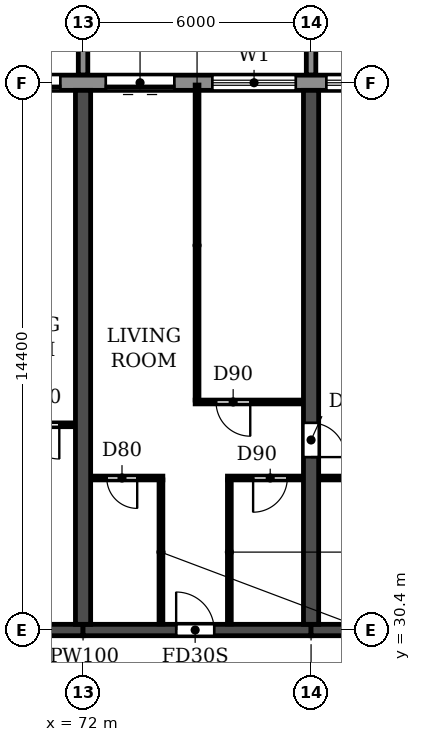
"""IFC4 building model, lengths in metres.
Left out: names, types, materials, properties, quantities, classifications, styles, units other than length and angle.
Written with IfcOpenShell. Run it as: python <this file> out.ifc"""

import sys

from ifc_helpers import new_model, si_unit, direction, frame, frame_2d, origin, place, context, subcontext, project, spatial, polyline, rectangle, outline, extrude, source, transform, mapped, element, fill, save


model = new_model("IFC4")
c1 = context("Model", 3, precision=1e-05, world=origin(), true_north=direction((0.0, 1.0)))
c2 = subcontext(c1, "Body", "Model", "MODEL_VIEW")
j1 = project(units=[si_unit("LENGTHUNIT", "METRE"), si_unit("PLANEANGLEUNIT", "RADIAN")], contexts=[c1])
p1 = place(None, origin())
s1 = spatial("IfcSite", under=j1, at=p1, CompositionType="ELEMENT")
p2 = place(p1, origin())
s2 = spatial("IfcBuilding", under=s1, at=p2, CompositionType="ELEMENT")
p3 = place(p2, frame((0.0, 0.0, 43.2)))
s3 = spatial("IfcBuildingStorey", under=s2, at=p3, CompositionType="ELEMENT", Elevation=43.2)
p4 = place(p3, frame((72.0, 30.55, 0.0), z_axis=(0.0, 0.0, 1.0), x_axis=(0.0, 1.0, 0.0)))
e1 = element("IfcWall", 1, at=p4, inside=s3, PredefinedType="SHEAR", context=c2, shape_type="SweptSolid", body=[
    extrude(rectangle(XDim=14.05, YDim=0.4, at=frame_2d((7.025, 0.0))), origin(), (0.0, 0.0, 1.0), 3.05),
])
p5 = place(p3, frame((78.0, 30.55, 0.0), z_axis=(0.0, 0.0, 1.0), x_axis=(0.0, 1.0, 0.0)))
e2 = element("IfcWall", 2, at=p5, inside=s3, PredefinedType="SHEAR", context=c2, shape_type="SweptSolid", body=[
    extrude(rectangle(XDim=14.05, YDim=0.4, at=frame_2d((7.025, 0.0))), origin(), (0.0, 0.0, 1.0), 3.05),
])
p6 = place(p5, frame((4.4, 0.0, 0.0)))
e3 = element("IfcOpeningElement", 3, at=p6, cuts=e2, PredefinedType="OPENING", context=c2, shape_type="SweptSolid", body=[
    extrude(rectangle(XDim=0.9, YDim=2.1, at=frame_2d((0.45, 1.05))), frame((0.0, 0.21, 0.0), z_axis=(0.0, -1.0, 0.0), x_axis=(1.0, 0.0, 0.0)), (0.0, 0.0, 1.0), 0.42),
])
p7 = place(p3, frame((66.0, 30.4, 0.0), z_axis=(0.0, 0.0, 1.0), x_axis=(1.0, 0.0, 0.0)))
e4 = element("IfcWall", 4, at=p7, inside=s3, PredefinedType="SHEAR", context=c2, shape_type="SweptSolid", body=[
    extrude(rectangle(XDim=6.0, YDim=0.3, at=frame_2d((3.0, 0.0))), origin(), (0.0, 0.0, 1.0), 2.45),
])
p8 = place(p7, frame((2.45, 0.0, 0.0)))
e5 = element("IfcOpeningElement", 5, at=p8, cuts=e4, PredefinedType="OPENING", context=c2, shape_type="SweptSolid", body=[
    extrude(rectangle(XDim=1.0, YDim=2.1, at=frame_2d((0.5, 1.05))), frame((0.0, 0.16, 0.0), z_axis=(0.0, -1.0, 0.0), x_axis=(1.0, 0.0, 0.0)), (0.0, 0.0, 1.0), 0.32),
])
p9 = place(p3, frame((72.0, 30.4, 0.0), z_axis=(0.0, 0.0, 1.0), x_axis=(1.0, 0.0, 0.0)))
e6 = element("IfcWall", 6, at=p9, inside=s3, PredefinedType="SHEAR", context=c2, shape_type="SweptSolid", body=[
    extrude(rectangle(XDim=6.0, YDim=0.3, at=frame_2d((3.0, 0.0))), origin(), (0.0, 0.0, 1.0), 2.45),
])
p10 = place(p9, frame((2.45, 0.0, 0.0)))
e7 = element("IfcOpeningElement", 7, at=p10, cuts=e6, PredefinedType="OPENING", context=c2, shape_type="SweptSolid", body=[
    extrude(rectangle(XDim=1.0, YDim=2.1, at=frame_2d((0.5, 1.05))), frame((0.0, 0.16, 0.0), z_axis=(0.0, -1.0, 0.0), x_axis=(1.0, 0.0, 0.0)), (0.0, 0.0, 1.0), 0.32),
])
p11 = place(p3, frame((78.0, 30.4, 0.0), z_axis=(0.0, 0.0, 1.0), x_axis=(1.0, 0.0, 0.0)))
e8 = element("IfcWall", 8, at=p11, inside=s3, PredefinedType="SHEAR", context=c2, shape_type="SweptSolid", body=[
    extrude(rectangle(XDim=6.0, YDim=0.3, at=frame_2d((3.0, 0.0))), origin(), (0.0, 0.0, 1.0), 2.45),
])
p12 = place(p3, frame((97.317, 44.8, 0.0), z_axis=(0.0, 0.0, 1.0), x_axis=(-1.0, 0.0, 0.0)))
e9 = element("IfcWall", 9, at=p12, inside=s3, PredefinedType="STANDARD", context=c2, shape_type="SweptSolid", body=[
    extrude(rectangle(XDim=92.634, YDim=0.4, at=frame_2d((46.317, 0.0))), origin(), (0.0, 0.0, 1.0), 3.05),
])
p13 = place(p12, frame((88.917, 0.0, 0.0)))
e10 = element("IfcOpeningElement", 10, at=p13, cuts=e9, PredefinedType="OPENING", context=c2, shape_type="SweptSolid", body=[
    extrude(rectangle(XDim=1.8, YDim=2.4, at=frame_2d((0.9, 1.2))), frame((0.0, 0.21, 0.0), z_axis=(0.0, -1.0, 0.0), x_axis=(1.0, 0.0, 0.0)), (0.0, 0.0, 1.0), 0.42),
])
p14 = place(p12, frame((85.717, 0.0, 0.9)))
e11 = element("IfcOpeningElement", 11, at=p14, cuts=e9, PredefinedType="OPENING", context=c2, shape_type="SweptSolid", body=[
    extrude(rectangle(XDim=2.2, YDim=1.5, at=frame_2d((1.1, 0.75))), frame((0.0, 0.21, 0.0), z_axis=(0.0, -1.0, 0.0), x_axis=(1.0, 0.0, 0.0)), (0.0, 0.0, 1.0), 0.42),
])
p15 = place(p12, frame((82.717, 0.0, 0.9)))
e12 = element("IfcOpeningElement", 12, at=p15, cuts=e9, PredefinedType="OPENING", context=c2, shape_type="SweptSolid", body=[
    extrude(rectangle(XDim=2.2, YDim=1.5, at=frame_2d((1.1, 0.75))), frame((0.0, 0.21, 0.0), z_axis=(0.0, -1.0, 0.0), x_axis=(1.0, 0.0, 0.0)), (0.0, 0.0, 1.0), 0.42),
])
p16 = place(p12, frame((79.717, 0.0, 0.9)))
e13 = element("IfcOpeningElement", 13, at=p16, cuts=e9, PredefinedType="OPENING", context=c2, shape_type="SweptSolid", body=[
    extrude(rectangle(XDim=2.2, YDim=1.5, at=frame_2d((1.1, 0.75))), frame((0.0, 0.21, 0.0), z_axis=(0.0, -1.0, 0.0), x_axis=(1.0, 0.0, 0.0)), (0.0, 0.0, 1.0), 0.42),
])
p17 = place(p12, frame((76.717, 0.0, 0.9)))
e14 = element("IfcOpeningElement", 14, at=p17, cuts=e9, PredefinedType="OPENING", context=c2, shape_type="SweptSolid", body=[
    extrude(rectangle(XDim=2.2, YDim=1.5, at=frame_2d((1.1, 0.75))), frame((0.0, 0.21, 0.0), z_axis=(0.0, -1.0, 0.0), x_axis=(1.0, 0.0, 0.0)), (0.0, 0.0, 1.0), 0.42),
])
p18 = place(p12, frame((73.917, 0.0, 0.0)))
e15 = element("IfcOpeningElement", 15, at=p18, cuts=e9, PredefinedType="OPENING", context=c2, shape_type="SweptSolid", body=[
    extrude(rectangle(XDim=1.8, YDim=2.4, at=frame_2d((0.9, 1.2))), frame((0.0, 0.21, 0.0), z_axis=(0.0, -1.0, 0.0), x_axis=(1.0, 0.0, 0.0)), (0.0, 0.0, 1.0), 0.42),
])
p19 = place(p12, frame((70.717, 0.0, 0.9)))
e16 = element("IfcOpeningElement", 16, at=p19, cuts=e9, PredefinedType="OPENING", context=c2, shape_type="SweptSolid", body=[
    extrude(rectangle(XDim=2.2, YDim=1.5, at=frame_2d((1.1, 0.75))), frame((0.0, 0.21, 0.0), z_axis=(0.0, -1.0, 0.0), x_axis=(1.0, 0.0, 0.0)), (0.0, 0.0, 1.0), 0.42),
])
p20 = place(p12, frame((67.717, 0.0, 0.9)))
e17 = element("IfcOpeningElement", 17, at=p20, cuts=e9, PredefinedType="OPENING", context=c2, shape_type="SweptSolid", body=[
    extrude(rectangle(XDim=2.2, YDim=1.5, at=frame_2d((1.1, 0.75))), frame((0.0, 0.21, 0.0), z_axis=(0.0, -1.0, 0.0), x_axis=(1.0, 0.0, 0.0)), (0.0, 0.0, 1.0), 0.42),
])
p21 = place(p12, frame((64.717, 0.0, 0.9)))
e18 = element("IfcOpeningElement", 18, at=p21, cuts=e9, PredefinedType="OPENING", context=c2, shape_type="SweptSolid", body=[
    extrude(rectangle(XDim=2.2, YDim=1.5, at=frame_2d((1.1, 0.75))), frame((0.0, 0.21, 0.0), z_axis=(0.0, -1.0, 0.0), x_axis=(1.0, 0.0, 0.0)), (0.0, 0.0, 1.0), 0.42),
])
p22 = place(p12, frame((61.917, 0.0, 0.0)))
e19 = element("IfcOpeningElement", 19, at=p22, cuts=e9, PredefinedType="OPENING", context=c2, shape_type="SweptSolid", body=[
    extrude(rectangle(XDim=1.8, YDim=2.4, at=frame_2d((0.9, 1.2))), frame((0.0, 0.21, 0.0), z_axis=(0.0, -1.0, 0.0), x_axis=(1.0, 0.0, 0.0)), (0.0, 0.0, 1.0), 0.42),
])
p23 = place(p12, frame((58.717, 0.0, 0.9)))
e20 = element("IfcOpeningElement", 20, at=p23, cuts=e9, PredefinedType="OPENING", context=c2, shape_type="SweptSolid", body=[
    extrude(rectangle(XDim=2.2, YDim=1.5, at=frame_2d((1.1, 0.75))), frame((0.0, 0.21, 0.0), z_axis=(0.0, -1.0, 0.0), x_axis=(1.0, 0.0, 0.0)), (0.0, 0.0, 1.0), 0.42),
])
p24 = place(p12, frame((55.717, 0.0, 0.9)))
e21 = element("IfcOpeningElement", 21, at=p24, cuts=e9, PredefinedType="OPENING", context=c2, shape_type="SweptSolid", body=[
    extrude(rectangle(XDim=2.2, YDim=1.5, at=frame_2d((1.1, 0.75))), frame((0.0, 0.21, 0.0), z_axis=(0.0, -1.0, 0.0), x_axis=(1.0, 0.0, 0.0)), (0.0, 0.0, 1.0), 0.42),
])
p25 = place(p12, frame((52.717, 0.0, 0.9)))
e22 = element("IfcOpeningElement", 22, at=p25, cuts=e9, PredefinedType="OPENING", context=c2, shape_type="SweptSolid", body=[
    extrude(rectangle(XDim=2.2, YDim=1.5, at=frame_2d((1.1, 0.75))), frame((0.0, 0.21, 0.0), z_axis=(0.0, -1.0, 0.0), x_axis=(1.0, 0.0, 0.0)), (0.0, 0.0, 1.0), 0.42),
])
p26 = place(p12, frame((49.917, 0.0, 0.0)))
e23 = element("IfcOpeningElement", 23, at=p26, cuts=e9, PredefinedType="OPENING", context=c2, shape_type="SweptSolid", body=[
    extrude(rectangle(XDim=1.8, YDim=2.4, at=frame_2d((0.9, 1.2))), frame((0.0, 0.21, 0.0), z_axis=(0.0, -1.0, 0.0), x_axis=(1.0, 0.0, 0.0)), (0.0, 0.0, 1.0), 0.42),
])
p27 = place(p12, frame((46.717, 0.0, 0.9)))
e24 = element("IfcOpeningElement", 24, at=p27, cuts=e9, PredefinedType="OPENING", context=c2, shape_type="SweptSolid", body=[
    extrude(rectangle(XDim=2.2, YDim=1.5, at=frame_2d((1.1, 0.75))), frame((0.0, 0.21, 0.0), z_axis=(0.0, -1.0, 0.0), x_axis=(1.0, 0.0, 0.0)), (0.0, 0.0, 1.0), 0.42),
])
p28 = place(p12, frame((43.717, 0.0, 0.9)))
e25 = element("IfcOpeningElement", 25, at=p28, cuts=e9, PredefinedType="OPENING", context=c2, shape_type="SweptSolid", body=[
    extrude(rectangle(XDim=2.2, YDim=1.5, at=frame_2d((1.1, 0.75))), frame((0.0, 0.21, 0.0), z_axis=(0.0, -1.0, 0.0), x_axis=(1.0, 0.0, 0.0)), (0.0, 0.0, 1.0), 0.42),
])
p29 = place(p12, frame((40.717, 0.0, 0.9)))
e26 = element("IfcOpeningElement", 26, at=p29, cuts=e9, PredefinedType="OPENING", context=c2, shape_type="SweptSolid", body=[
    extrude(rectangle(XDim=2.2, YDim=1.5, at=frame_2d((1.1, 0.75))), frame((0.0, 0.21, 0.0), z_axis=(0.0, -1.0, 0.0), x_axis=(1.0, 0.0, 0.0)), (0.0, 0.0, 1.0), 0.42),
])
p30 = place(p12, frame((37.917, 0.0, 0.0)))
e27 = element("IfcOpeningElement", 27, at=p30, cuts=e9, PredefinedType="OPENING", context=c2, shape_type="SweptSolid", body=[
    extrude(rectangle(XDim=1.8, YDim=2.4, at=frame_2d((0.9, 1.2))), frame((0.0, 0.21, 0.0), z_axis=(0.0, -1.0, 0.0), x_axis=(1.0, 0.0, 0.0)), (0.0, 0.0, 1.0), 0.42),
])
p31 = place(p12, frame((34.717, 0.0, 0.9)))
e28 = element("IfcOpeningElement", 28, at=p31, cuts=e9, PredefinedType="OPENING", context=c2, shape_type="SweptSolid", body=[
    extrude(rectangle(XDim=2.2, YDim=1.5, at=frame_2d((1.1, 0.75))), frame((0.0, 0.21, 0.0), z_axis=(0.0, -1.0, 0.0), x_axis=(1.0, 0.0, 0.0)), (0.0, 0.0, 1.0), 0.42),
])
p32 = place(p12, frame((31.717, 0.0, 0.9)))
e29 = element("IfcOpeningElement", 29, at=p32, cuts=e9, PredefinedType="OPENING", context=c2, shape_type="SweptSolid", body=[
    extrude(rectangle(XDim=2.2, YDim=1.5, at=frame_2d((1.1, 0.75))), frame((0.0, 0.21, 0.0), z_axis=(0.0, -1.0, 0.0), x_axis=(1.0, 0.0, 0.0)), (0.0, 0.0, 1.0), 0.42),
])
p33 = place(p12, frame((28.717, 0.0, 0.9)))
e30 = element("IfcOpeningElement", 30, at=p33, cuts=e9, PredefinedType="OPENING", context=c2, shape_type="SweptSolid", body=[
    extrude(rectangle(XDim=2.2, YDim=1.5, at=frame_2d((1.1, 0.75))), frame((0.0, 0.21, 0.0), z_axis=(0.0, -1.0, 0.0), x_axis=(1.0, 0.0, 0.0)), (0.0, 0.0, 1.0), 0.42),
])
p34 = place(p12, frame((25.917, 0.0, 0.0)))
e31 = element("IfcOpeningElement", 31, at=p34, cuts=e9, PredefinedType="OPENING", context=c2, shape_type="SweptSolid", body=[
    extrude(rectangle(XDim=1.8, YDim=2.4, at=frame_2d((0.9, 1.2))), frame((0.0, 0.21, 0.0), z_axis=(0.0, -1.0, 0.0), x_axis=(1.0, 0.0, 0.0)), (0.0, 0.0, 1.0), 0.42),
])
p35 = place(p12, frame((22.917, 0.0, 0.0)))
e32 = element("IfcOpeningElement", 32, at=p35, cuts=e9, PredefinedType="OPENING", context=c2, shape_type="SweptSolid", body=[
    extrude(rectangle(XDim=1.8, YDim=2.4, at=frame_2d((0.9, 1.2))), frame((0.0, 0.21, 0.0), z_axis=(0.0, -1.0, 0.0), x_axis=(1.0, 0.0, 0.0)), (0.0, 0.0, 1.0), 0.42),
])
p36 = place(p12, frame((19.717, 0.0, 0.9)))
e33 = element("IfcOpeningElement", 33, at=p36, cuts=e9, PredefinedType="OPENING", context=c2, shape_type="SweptSolid", body=[
    extrude(rectangle(XDim=2.2, YDim=1.5, at=frame_2d((1.1, 0.75))), frame((0.0, 0.21, 0.0), z_axis=(0.0, -1.0, 0.0), x_axis=(1.0, 0.0, 0.0)), (0.0, 0.0, 1.0), 0.42),
])
p37 = place(p12, frame((16.717, 0.0, 0.9)))
e34 = element("IfcOpeningElement", 34, at=p37, cuts=e9, PredefinedType="OPENING", context=c2, shape_type="SweptSolid", body=[
    extrude(rectangle(XDim=2.2, YDim=1.5, at=frame_2d((1.1, 0.75))), frame((0.0, 0.21, 0.0), z_axis=(0.0, -1.0, 0.0), x_axis=(1.0, 0.0, 0.0)), (0.0, 0.0, 1.0), 0.42),
])
p38 = place(p12, frame((13.717, 0.0, 0.9)))
e35 = element("IfcOpeningElement", 35, at=p38, cuts=e9, PredefinedType="OPENING", context=c2, shape_type="SweptSolid", body=[
    extrude(rectangle(XDim=2.2, YDim=1.5, at=frame_2d((1.1, 0.75))), frame((0.0, 0.21, 0.0), z_axis=(0.0, -1.0, 0.0), x_axis=(1.0, 0.0, 0.0)), (0.0, 0.0, 1.0), 0.42),
])
p39 = place(p12, frame((10.717, 0.0, 0.9)))
e36 = element("IfcOpeningElement", 36, at=p39, cuts=e9, PredefinedType="OPENING", context=c2, shape_type="SweptSolid", body=[
    extrude(rectangle(XDim=2.2, YDim=1.5, at=frame_2d((1.1, 0.75))), frame((0.0, 0.21, 0.0), z_axis=(0.0, -1.0, 0.0), x_axis=(1.0, 0.0, 0.0)), (0.0, 0.0, 1.0), 0.42),
])
p40 = place(p12, frame((7.917, 0.0, 0.0)))
e37 = element("IfcOpeningElement", 37, at=p40, cuts=e9, PredefinedType="OPENING", context=c2, shape_type="SweptSolid", body=[
    extrude(rectangle(XDim=1.8, YDim=2.4, at=frame_2d((0.9, 1.2))), frame((0.0, 0.21, 0.0), z_axis=(0.0, -1.0, 0.0), x_axis=(1.0, 0.0, 0.0)), (0.0, 0.0, 1.0), 0.42),
])
p41 = place(p12, frame((4.717, 0.0, 0.9)))
e38 = element("IfcOpeningElement", 38, at=p41, cuts=e9, PredefinedType="OPENING", context=c2, shape_type="SweptSolid", body=[
    extrude(rectangle(XDim=2.2, YDim=1.5, at=frame_2d((1.1, 0.75))), frame((0.0, 0.21, 0.0), z_axis=(0.0, -1.0, 0.0), x_axis=(1.0, 0.0, 0.0)), (0.0, 0.0, 1.0), 0.42),
])
p42 = place(p12, frame((1.917, 0.0, 0.0)))
e39 = element("IfcOpeningElement", 39, at=p42, cuts=e9, PredefinedType="OPENING", context=c2, shape_type="SweptSolid", body=[
    extrude(rectangle(XDim=1.8, YDim=2.4, at=frame_2d((0.9, 1.2))), frame((0.0, 0.21, 0.0), z_axis=(0.0, -1.0, 0.0), x_axis=(1.0, 0.0, 0.0)), (0.0, 0.0, 1.0), 0.42),
])
m1 = source(origin(), c2, "Body", "SweptSolid", [
    extrude(outline(polyline([(0.0, 0.0), (0.25, 0.0), (0.25, 3.1), (0.0, 3.1), (0.0, 0.0)])), origin(), (0.0, 0.0, 1.0), 3.1),
])
for number, where in (
    (40, (71.875, 45.0, 0.0)),
    (41, (77.875, 45.0, 0.0)),
):
    element("IfcWall", number, at=place(p3, frame(where)), inside=s3, PredefinedType="STANDARD", context=c2, shape_type="MappedRepresentation", body=[
        mapped(m1, transform((0.0, 0.0, 0.0))),
    ])
p43 = place(p3, frame((72.21, 34.4, 0.0), z_axis=(0.0, 0.0, 1.0), x_axis=(1.0, 0.0, 0.0)))
e42 = element("IfcWall", 42, at=p43, inside=s3, PredefinedType="PARTITIONING", context=c2, shape_type="SweptSolid", body=[
    extrude(rectangle(XDim=1.89, YDim=0.1, at=frame_2d((0.945, 0.0))), origin(), (0.0, 0.0, 1.0), 3.05),
])
p44 = place(p43, frame((0.415, 0.0, 0.0)))
e43 = element("IfcOpeningElement", 43, at=p44, cuts=e42, PredefinedType="OPENING", context=c2, shape_type="SweptSolid", body=[
    extrude(rectangle(XDim=0.8, YDim=2.1, at=frame_2d((0.4, 1.05))), frame((0.0, 0.06, 0.0), z_axis=(0.0, -1.0, 0.0), x_axis=(1.0, 0.0, 0.0)), (0.0, 0.0, 1.0), 0.12),
])
p45 = place(p3, frame((75.8, 34.4, 0.0), z_axis=(0.0, 0.0, 1.0), x_axis=(1.0, 0.0, 0.0)))
e44 = element("IfcWall", 44, at=p45, inside=s3, PredefinedType="PARTITIONING", context=c2, shape_type="SweptSolid", body=[
    extrude(rectangle(XDim=1.99, YDim=0.1, at=frame_2d((0.995, 0.0))), origin(), (0.0, 0.0, 1.0), 3.05),
])
p46 = place(p45, frame((0.675, 0.0, 0.0)))
e45 = element("IfcOpeningElement", 45, at=p46, cuts=e44, PredefinedType="OPENING", context=c2, shape_type="SweptSolid", body=[
    extrude(rectangle(XDim=0.9, YDim=2.1, at=frame_2d((0.45, 1.05))), frame((0.0, 0.06, 0.0), z_axis=(0.0, -1.0, 0.0), x_axis=(1.0, 0.0, 0.0)), (0.0, 0.0, 1.0), 0.12),
])
p47 = place(p3, frame((78.21, 34.4, 0.0), z_axis=(0.0, 0.0, 1.0), x_axis=(1.0, 0.0, 0.0)))
e46 = element("IfcWall", 46, at=p47, inside=s3, PredefinedType="PARTITIONING", context=c2, shape_type="SweptSolid", body=[
    extrude(rectangle(XDim=2.69, YDim=0.1, at=frame_2d((1.345, 0.0))), origin(), (0.0, 0.0, 1.0), 3.05),
])
p48 = place(p47, frame((0.89, 0.0, 0.0)))
e47 = element("IfcOpeningElement", 47, at=p48, cuts=e46, PredefinedType="OPENING", context=c2, shape_type="SweptSolid", body=[
    extrude(rectangle(XDim=0.8, YDim=2.1, at=frame_2d((0.4, 1.05))), frame((0.0, 0.06, 0.0), z_axis=(0.0, -1.0, 0.0), x_axis=(1.0, 0.0, 0.0)), (0.0, 0.0, 1.0), 0.12),
])
p49 = place(p3, frame((69.8, 35.8, 0.0), z_axis=(0.0, 0.0, 1.0), x_axis=(1.0, 0.0, 0.0)))
e48 = element("IfcWall", 48, at=p49, inside=s3, PredefinedType="PARTITIONING", context=c2, shape_type="SweptSolid", body=[
    extrude(rectangle(XDim=1.99, YDim=0.1, at=frame_2d((0.995, 0.0))), origin(), (0.0, 0.0, 1.0), 3.05),
])
p50 = place(p49, frame((0.675, 0.0, 0.0)))
e49 = element("IfcOpeningElement", 49, at=p50, cuts=e48, PredefinedType="OPENING", context=c2, shape_type="SweptSolid", body=[
    extrude(rectangle(XDim=0.9, YDim=2.1, at=frame_2d((0.45, 1.05))), frame((0.0, 0.06, 0.0), z_axis=(0.0, -1.0, 0.0), x_axis=(1.0, 0.0, 0.0)), (0.0, 0.0, 1.0), 0.12),
])
p51 = place(p3, frame((74.95, 36.4, 0.0), z_axis=(0.0, 0.0, 1.0), x_axis=(1.0, 0.0, 0.0)))
e50 = element("IfcWall", 50, at=p51, inside=s3, PredefinedType="PARTITIONING", context=c2, shape_type="SweptSolid", body=[
    extrude(rectangle(XDim=2.84, YDim=0.1, at=frame_2d((1.42, 0.0))), origin(), (0.0, 0.0, 1.0), 3.05),
])
p52 = place(p51, frame((0.55, 0.0, 0.0)))
e51 = element("IfcOpeningElement", 51, at=p52, cuts=e50, PredefinedType="OPENING", context=c2, shape_type="SweptSolid", body=[
    extrude(rectangle(XDim=0.9, YDim=2.1, at=frame_2d((0.45, 1.05))), frame((0.0, 0.06, 0.0), z_axis=(0.0, -1.0, 0.0), x_axis=(1.0, 0.0, 0.0)), (0.0, 0.0, 1.0), 0.12),
])
p53 = place(p3, frame((74.05, 30.56, 0.0), z_axis=(0.0, 0.0, 1.0), x_axis=(0.0, 1.0, 0.0)))
e52 = element("IfcWall", 52, at=p53, inside=s3, PredefinedType="PARTITIONING", context=c2, shape_type="SweptSolid", body=[
    extrude(rectangle(XDim=3.79, YDim=0.1, at=frame_2d((1.895, 0.0))), origin(), (0.0, 0.0, 1.0), 3.05),
])
p54 = place(p3, frame((75.0, 36.45, 0.0), z_axis=(0.0, 0.0, 1.0), x_axis=(0.0, 1.0, 0.0)))
e53 = element("IfcWall", 53, at=p54, inside=s3, PredefinedType="PARTITIONING", context=c2, shape_type="SweptSolid", body=[
    extrude(rectangle(XDim=8.29, YDim=0.1, at=frame_2d((4.145, 0.0))), origin(), (0.0, 0.0, 1.0), 3.05),
])
p55 = place(p3, frame((75.85, 30.56, 0.0), z_axis=(0.0, 0.0, 1.0), x_axis=(0.0, 1.0, 0.0)))
e54 = element("IfcWall", 54, at=p55, inside=s3, PredefinedType="PARTITIONING", context=c2, shape_type="SweptSolid", body=[
    extrude(rectangle(XDim=3.79, YDim=0.1, at=frame_2d((1.895, 0.0))), origin(), (0.0, 0.0, 1.0), 3.05),
])
p56 = place(p34, origin())
e55 = element("IfcDoor", 55, at=p56, inside=s3, OperationType="DOUBLE_DOOR_SLIDING", PredefinedType="DOOR", context=c2, shape_type="SweptSolid", body=[
    extrude(rectangle(XDim=1.8, YDim=2.4, at=frame_2d((0.9, 1.2))), frame((0.0, 0.025, 0.0), z_axis=(0.0, -1.0, 0.0), x_axis=(1.0, 0.0, 0.0)), (0.0, 0.0, 1.0), 0.05),
])
fill(e31, e55)
p57 = place(p35, origin())
e56 = element("IfcDoor", 56, at=p57, inside=s3, OperationType="DOUBLE_DOOR_SLIDING", PredefinedType="DOOR", context=c2, shape_type="SweptSolid", body=[
    extrude(rectangle(XDim=1.8, YDim=2.4, at=frame_2d((0.9, 1.2))), frame((0.0, 0.025, 0.0), z_axis=(0.0, -1.0, 0.0), x_axis=(1.0, 0.0, 0.0)), (0.0, 0.0, 1.0), 0.05),
])
fill(e32, e56)
p58 = place(p36, origin())
e57 = element("IfcWindow", 57, at=p58, inside=s3, PartitioningType="DOUBLE_PANEL_HORIZONTAL", PredefinedType="WINDOW", context=c2, shape_type="SweptSolid", body=[
    extrude(rectangle(XDim=2.2, YDim=1.5, at=frame_2d((1.1, 0.75))), frame((0.0, 0.03, 0.0), z_axis=(0.0, -1.0, 0.0), x_axis=(1.0, 0.0, 0.0)), (0.0, 0.0, 1.0), 0.06),
])
fill(e33, e57)
p59 = place(p37, origin())
e58 = element("IfcWindow", 58, at=p59, inside=s3, PartitioningType="DOUBLE_PANEL_HORIZONTAL", PredefinedType="WINDOW", context=c2, shape_type="SweptSolid", body=[
    extrude(rectangle(XDim=2.2, YDim=1.5, at=frame_2d((1.1, 0.75))), frame((0.0, 0.03, 0.0), z_axis=(0.0, -1.0, 0.0), x_axis=(1.0, 0.0, 0.0)), (0.0, 0.0, 1.0), 0.06),
])
fill(e34, e58)
p60 = place(p50, frame((0.9, 0.0, 0.0), z_axis=(0.0, 0.0, 1.0), x_axis=(-1.0, 0.0, 0.0)))
e59 = element("IfcDoor", 59, at=p60, inside=s3, OperationType="SINGLE_SWING_LEFT", PredefinedType="DOOR", context=c2, shape_type="SweptSolid", body=[
    extrude(rectangle(XDim=0.9, YDim=2.1, at=frame_2d((0.45, 1.05))), frame((0.0, 0.025, 0.0), z_axis=(0.0, -1.0, 0.0), x_axis=(1.0, 0.0, 0.0)), (0.0, 0.0, 1.0), 0.05),
])
fill(e49, e59)
p61 = place(p44, frame((0.8, 0.0, 0.0), z_axis=(0.0, 0.0, 1.0), x_axis=(-1.0, 0.0, 0.0)))
e60 = element("IfcDoor", 60, at=p61, inside=s3, OperationType="SINGLE_SWING_LEFT", PredefinedType="DOOR", context=c2, shape_type="SweptSolid", body=[
    extrude(rectangle(XDim=0.8, YDim=2.1, at=frame_2d((0.4, 1.05))), frame((0.0, 0.025, 0.0), z_axis=(0.0, -1.0, 0.0), x_axis=(1.0, 0.0, 0.0)), (0.0, 0.0, 1.0), 0.05),
])
fill(e43, e60)
p62 = place(p10, origin())
e61 = element("IfcDoor", 61, at=p62, inside=s3, OperationType="SINGLE_SWING_LEFT", PredefinedType="DOOR", context=c2, shape_type="SweptSolid", body=[
    extrude(rectangle(XDim=1.0, YDim=2.1, at=frame_2d((0.5, 1.05))), frame((0.0, 0.025, 0.0), z_axis=(0.0, -1.0, 0.0), x_axis=(1.0, 0.0, 0.0)), (0.0, 0.0, 1.0), 0.05),
])
fill(e7, e61)
p63 = place(p52, frame((0.9, 0.0, 0.0), z_axis=(0.0, 0.0, 1.0), x_axis=(-1.0, 0.0, 0.0)))
e62 = element("IfcDoor", 62, at=p63, inside=s3, OperationType="SINGLE_SWING_LEFT", PredefinedType="DOOR", context=c2, shape_type="SweptSolid", body=[
    extrude(rectangle(XDim=0.9, YDim=2.1, at=frame_2d((0.45, 1.05))), frame((0.0, 0.025, 0.0), z_axis=(0.0, -1.0, 0.0), x_axis=(1.0, 0.0, 0.0)), (0.0, 0.0, 1.0), 0.05),
])
fill(e51, e62)
p64 = place(p46, frame((0.9, 0.0, 0.0), z_axis=(0.0, 0.0, 1.0), x_axis=(-1.0, 0.0, 0.0)))
e63 = element("IfcDoor", 63, at=p64, inside=s3, OperationType="SINGLE_SWING_RIGHT", PredefinedType="DOOR", context=c2, shape_type="SweptSolid", body=[
    extrude(rectangle(XDim=0.9, YDim=2.1, at=frame_2d((0.45, 1.05))), frame((0.0, 0.025, 0.0), z_axis=(0.0, -1.0, 0.0), x_axis=(1.0, 0.0, 0.0)), (0.0, 0.0, 1.0), 0.05),
])
fill(e45, e63)
p65 = place(p6, frame((0.9, 0.0, 0.0), z_axis=(0.0, 0.0, 1.0), x_axis=(-1.0, 0.0, 0.0)))
e64 = element("IfcDoor", 64, at=p65, inside=s3, OperationType="SINGLE_SWING_RIGHT", PredefinedType="DOOR", context=c2, shape_type="SweptSolid", body=[
    extrude(rectangle(XDim=0.9, YDim=2.1, at=frame_2d((0.45, 1.05))), frame((0.0, 0.025, 0.0), z_axis=(0.0, -1.0, 0.0), x_axis=(1.0, 0.0, 0.0)), (0.0, 0.0, 1.0), 0.05),
])
fill(e3, e64)
save(model, sys.argv[1])
